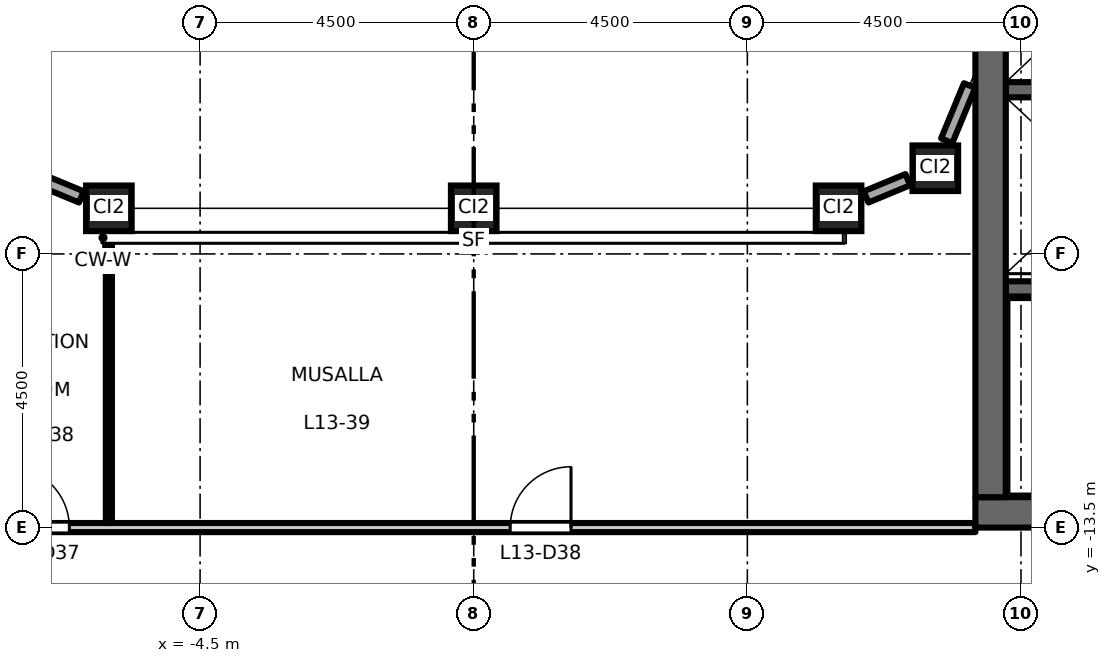
"""IFC4 building model, lengths in metres.
Left out: names, types, materials, properties, quantities, classifications, styles, units other than length and angle.
Written with IfcOpenShell. Run it as: python <this file> out.ifc"""

import sys

from ifc_helpers import new_model, si_unit, direction, frame, frame_2d, origin, origin_2d, place, context, subcontext, project, spatial, rectangle, hollow_rectangle, extrude, element, fill, save


model = new_model("IFC4")
c1 = context("Model", 3, precision=1e-05, world=origin(), true_north=direction((0.0, 1.0)))
c2 = subcontext(c1, "Body", "Model", "MODEL_VIEW")
j1 = project(units=[si_unit("LENGTHUNIT", "METRE"), si_unit("PLANEANGLEUNIT", "RADIAN")], contexts=[c1])
p1 = place(None, origin())
s1 = spatial("IfcSite", under=j1, at=p1, CompositionType="ELEMENT")
p2 = place(p1, origin())
s2 = spatial("IfcBuilding", under=s1, at=p2, CompositionType="ELEMENT")
p3 = place(p2, frame((0.0, 0.0, 62.7)))
s3 = spatial("IfcBuildingStorey", under=s2, at=p3, CompositionType="ELEMENT", Elevation=62.7)
for number, where, z_axis, x_axis in (
    (1, (-6.0, -8.25, 0.0), (0.0, 0.0, 1.0), (1.0, 0.0, 0.0)),
    (2, (0.0, -8.25, 0.0), (0.0, 0.0, 1.0), (1.0, 0.0, 0.0)),
    (3, (6.0, -8.25, 0.0), (0.0, 0.0, 1.0), (1.0, 0.0, 0.0)),
    (4, (7.591, -7.591, 0.0), (0.0, 0.0, 1.0), (1.0, 0.0, 0.0)),
):
    element("IfcColumn", number, at=place(p3, frame(where, z_axis=z_axis, x_axis=x_axis)), inside=s3, PredefinedType="COLUMN", context=c2, shape_type="SweptSolid", body=[
        extrude(hollow_rectangle(XDim=0.75, YDim=0.75, WallThickness=0.045, at=origin_2d()), origin(), (0.0, 0.0, 1.0), 4.5),
    ])
p4 = place(p3, frame((8.75, -6.3, 0.0), z_axis=(0.0, 0.0, 1.0), x_axis=(1.0, 0.0, 0.0)))
e5 = element("IfcWall", 5, at=p4, inside=s3, PredefinedType="SHEAR", context=c2, shape_type="SweptSolid", body=[
    extrude(rectangle(XDim=3.1, YDim=0.25, at=frame_2d((1.55, 0.0))), origin(), (0.0, 0.0, 1.0), 4.35),
])
p5 = place(p3, frame((8.75, -9.575, 0.0), z_axis=(0.0, 0.0, 1.0), x_axis=(1.0, 0.0, 0.0)))
e6 = element("IfcWall", 6, at=p5, inside=s3, PredefinedType="SHEAR", context=c2, shape_type="SweptSolid", body=[
    extrude(rectangle(XDim=8.0, YDim=0.25, at=frame_2d((4.0, 0.0))), origin(), (0.0, 0.0, 1.0), 4.35),
])
p6 = place(p5, frame((6.65, 0.0, 0.0)))
e7 = element("IfcOpeningElement", 7, at=p6, cuts=e6, PredefinedType="OPENING", context=c2, shape_type="SweptSolid", body=[
    extrude(rectangle(XDim=1.1, YDim=2.1, at=frame_2d((0.55, 1.05))), frame((0.0, 0.135, 0.0), z_axis=(0.0, -1.0, 0.0), x_axis=(1.0, 0.0, 0.0)), (0.0, 0.0, 1.0), 0.27),
])
p7 = place(p3, frame((8.25, -13.25, 0.0), z_axis=(0.0, 0.0, 1.0), x_axis=(1.0, 0.0, 0.0)))
e8 = element("IfcWall", 8, at=p7, inside=s3, PredefinedType="SHEAR", context=c2, shape_type="SweptSolid", body=[
    extrude(rectangle(XDim=13.5, YDim=0.5, at=frame_2d((6.75, 0.0))), origin(), (0.0, 0.0, 1.0), 4.35),
])
p8 = place(p3, frame((8.5, -13.0, 0.0), z_axis=(0.0, 0.0, 1.0), x_axis=(0.0, 1.0, 0.0)))
e9 = element("IfcWall", 9, at=p8, inside=s3, PredefinedType="SHEAR", context=c2, shape_type="SweptSolid", body=[
    extrude(rectangle(XDim=26.0, YDim=0.5, at=frame_2d((13.0, 0.0))), origin(), (0.0, 0.0, 1.0), 4.35),
])
p9 = place(p3, frame((6.453, -8.062, 0.0), z_axis=(0.0, 0.0, 1.0), x_axis=(0.923940677943, 0.382535780864, 0.0)))
e10 = element("IfcWall", 10, at=p9, inside=s3, PredefinedType="STANDARD", context=c2, shape_type="SweptSolid", body=[
    extrude(rectangle(XDim=0.742, YDim=0.2, at=frame_2d((0.371, 0.0))), origin(), (0.0, 0.0, 1.0), 3.73),
])
p10 = place(p3, frame((7.779, -7.138, 0.0), z_axis=(0.0, 0.0, 1.0), x_axis=(0.382549378284, 0.923935048136, 0.0)))
e11 = element("IfcWall", 11, at=p10, inside=s3, PredefinedType="STANDARD", context=c2, shape_type="SweptSolid", body=[
    extrude(rectangle(XDim=0.982, YDim=0.2, at=frame_2d((0.491, 0.0))), origin(), (0.0, 0.0, 1.0), 3.73),
])
p11 = place(p3, frame((-7.138, -7.779, 0.0), z_axis=(0.0, 0.0, 1.0), x_axis=(0.923940677943, -0.382535780864, 0.0)))
e12 = element("IfcWall", 12, at=p11, inside=s3, PredefinedType="STANDARD", context=c2, shape_type="SweptSolid", body=[
    extrude(rectangle(XDim=0.742, YDim=0.2, at=frame_2d((0.371, 0.0))), origin(), (0.0, 0.0, 1.0), 3.73),
])
p12 = place(p3, frame((-8.25, -13.5, 0.0), z_axis=(0.0, 0.0, 1.0), x_axis=(1.0, 0.0, 0.0)))
e13 = element("IfcWall", 13, at=p12, inside=s3, PredefinedType="PARTITIONING", context=c2, shape_type="SweptSolid", body=[
    extrude(rectangle(XDim=16.5, YDim=0.15, at=frame_2d((8.25, 0.0))), origin(), (0.0, 0.0, 1.0), 3.85),
])
p13 = place(p12, frame((0.6, 0.0, 0.0)))
e14 = element("IfcOpeningElement", 14, at=p13, cuts=e13, PredefinedType="OPENING", context=c2, shape_type="SweptSolid", body=[
    extrude(rectangle(XDim=1.0, YDim=2.1, at=frame_2d((0.5, 1.05))), frame((0.0, 0.085, 0.0), z_axis=(0.0, -1.0, 0.0), x_axis=(1.0, 0.0, 0.0)), (0.0, 0.0, 1.0), 0.17),
])
p14 = place(p12, frame((8.85, 0.0, 0.0)))
e15 = element("IfcOpeningElement", 15, at=p14, cuts=e13, PredefinedType="OPENING", context=c2, shape_type="SweptSolid", body=[
    extrude(rectangle(XDim=1.0, YDim=2.1, at=frame_2d((0.5, 1.05))), frame((0.0, 0.085, 0.0), z_axis=(0.0, -1.0, 0.0), x_axis=(1.0, 0.0, 0.0)), (0.0, 0.0, 1.0), 0.17),
])
p15 = place(p3, frame((-6.0, -13.425, 0.0), z_axis=(0.0, 0.0, 1.0), x_axis=(0.0, 1.0, 0.0)))
e16 = element("IfcWall", 16, at=p15, inside=s3, PredefinedType="PARTITIONING", context=c2, shape_type="SweptSolid", body=[
    extrude(rectangle(XDim=4.725, YDim=0.1, at=frame_2d((2.363, 0.0))), origin(), (0.0, 0.0, 1.0), 4.35),
])
p16 = place(p13, origin())
e17 = element("IfcDoor", 17, at=p16, inside=s3, OperationType="SINGLE_SWING_LEFT", PredefinedType="DOOR", context=c2, shape_type="SweptSolid", body=[
    extrude(rectangle(XDim=1.0, YDim=2.1, at=frame_2d((0.5, 1.05))), frame((0.0, 0.025, 0.0), z_axis=(0.0, -1.0, 0.0), x_axis=(1.0, 0.0, 0.0)), (0.0, 0.0, 1.0), 0.05),
])
fill(e14, e17)
p17 = place(p14, origin())
e18 = element("IfcDoor", 18, at=p17, inside=s3, OperationType="SINGLE_SWING_RIGHT", PredefinedType="DOOR", context=c2, shape_type="SweptSolid", body=[
    extrude(rectangle(XDim=1.0, YDim=2.1, at=frame_2d((0.5, 1.05))), frame((0.0, 0.025, 0.0), z_axis=(0.0, -1.0, 0.0), x_axis=(1.0, 0.0, 0.0)), (0.0, 0.0, 1.0), 0.05),
])
fill(e15, e18)
save(model, sys.argv[1])
